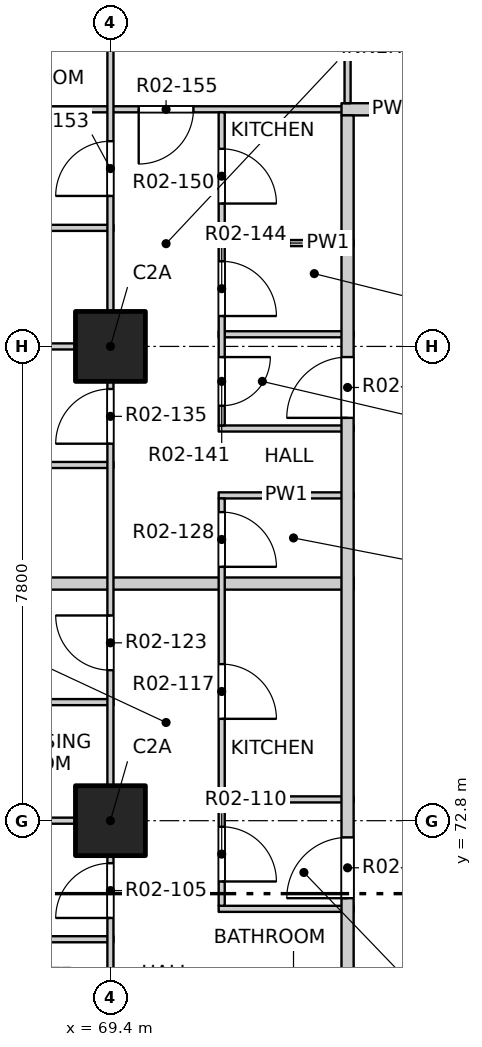
"""IFC4 building model, lengths in metres.
Left out: names, types, materials, properties, quantities, classifications, styles, units other than length and angle.
Written with IfcOpenShell. Run it as: python <this file> out.ifc"""

import sys

from ifc_helpers import new_model, si_unit, direction, frame, frame_2d, origin, origin_2d, place, context, subcontext, project, spatial, rectangle, extrude, element, fill, save


model = new_model("IFC4")
c1 = context("Model", 3, precision=1e-05, world=origin(), true_north=direction((0.0, 1.0)))
c2 = subcontext(c1, "Body", "Model", "MODEL_VIEW")
j1 = project(units=[si_unit("LENGTHUNIT", "METRE"), si_unit("PLANEANGLEUNIT", "RADIAN")], contexts=[c1])
p1 = place(None, origin())
s1 = spatial("IfcSite", under=j1, at=p1, CompositionType="ELEMENT")
p2 = place(p1, origin())
s2 = spatial("IfcBuilding", under=s1, at=p2, CompositionType="ELEMENT")
p3 = place(p2, frame((0.0, 0.0, 29.7)))
s3 = spatial("IfcBuildingStorey", under=s2, at=p3, CompositionType="ELEMENT", Elevation=29.7)
for number, where, z_axis, x_axis in (
    (1, (69.4, 72.8, -0.25), (0.0, 0.0, 1.0), (1.0, 0.0, 0.0)),
    (2, (69.4, 80.6, -0.25), (0.0, 0.0, 1.0), (1.0, 0.0, 0.0)),
):
    element("IfcColumn", number, at=place(p3, frame(where, z_axis=z_axis, x_axis=x_axis)), inside=s3, PredefinedType="COLUMN", context=c2, shape_type="SweptSolid", body=[
        extrude(rectangle(XDim=1.15, YDim=1.15, at=origin_2d()), origin(), (0.0, 0.0, 1.0), 3.4),
    ])
p4 = place(p3, frame((66.05, 70.85, 0.0), z_axis=(0.0, 0.0, 1.0), x_axis=(1.0, 0.0, 0.0)))
e3 = element("IfcWall", 3, at=p4, inside=s3, PredefinedType="PARTITIONING", context=c2, shape_type="SweptSolid", body=[
    extrude(rectangle(XDim=3.4, YDim=0.1, at=frame_2d((1.7, 0.0))), origin(), (0.0, 0.0, 1.0), 3.15),
])
p5 = place(p3, frame((71.18, 71.35, 0.0), z_axis=(0.0, 0.0, 1.0), x_axis=(1.0, 0.0, 0.0)))
e4 = element("IfcWall", 4, at=p5, inside=s3, PredefinedType="PARTITIONING", context=c2, shape_type="SweptSolid", body=[
    extrude(rectangle(XDim=2.22, YDim=0.1, at=frame_2d((1.11, 0.0))), origin(), (0.0, 0.0, 1.0), 3.15),
])
p6 = place(p3, frame((61.9, 72.8, 0.0), z_axis=(0.0, 0.0, 1.0), x_axis=(1.0, 0.0, 0.0)))
e5 = element("IfcWall", 5, at=p6, inside=s3, PredefinedType="PARTITIONING", context=c2, shape_type="SweptSolid", body=[
    extrude(rectangle(XDim=7.55, YDim=0.1, at=frame_2d((3.775, 0.0))), origin(), (0.0, 0.0, 1.0), 2.55),
])
p7 = place(p3, frame((71.18, 73.15, 0.0), z_axis=(0.0, 0.0, 1.0), x_axis=(1.0, 0.0, 0.0)))
e6 = element("IfcWall", 6, at=p7, inside=s3, PredefinedType="PARTITIONING", context=c2, shape_type="SweptSolid", body=[
    extrude(rectangle(XDim=2.22, YDim=0.1, at=frame_2d((1.11, 0.0))), origin(), (0.0, 0.0, 1.0), 3.15),
])
p8 = place(p3, frame((66.05, 74.75, 0.0), z_axis=(0.0, 0.0, 1.0), x_axis=(1.0, 0.0, 0.0)))
e7 = element("IfcWall", 7, at=p8, inside=s3, PredefinedType="PARTITIONING", context=c2, shape_type="SweptSolid", body=[
    extrude(rectangle(XDim=3.4, YDim=0.1, at=frame_2d((1.7, 0.0))), origin(), (0.0, 0.0, 1.0), 3.15),
])
p9 = place(p3, frame((61.9, 76.7, 0.0), z_axis=(0.0, 0.0, 1.0), x_axis=(1.0, 0.0, 0.0)))
e8 = element("IfcWall", 8, at=p9, inside=s3, PredefinedType="PARTITIONING", context=c2, shape_type="SweptSolid", body=[
    extrude(rectangle(XDim=11.5, YDim=0.2, at=frame_2d((5.75, 0.0))), origin(), (0.0, 0.0, 1.0), 3.15),
])
p10 = place(p3, frame((71.18, 78.15, 0.0), z_axis=(0.0, 0.0, 1.0), x_axis=(1.0, 0.0, 0.0)))
e9 = element("IfcWall", 9, at=p10, inside=s3, PredefinedType="PARTITIONING", context=c2, shape_type="SweptSolid", body=[
    extrude(rectangle(XDim=2.22, YDim=0.1, at=frame_2d((1.11, 0.0))), origin(), (0.0, 0.0, 1.0), 3.15),
])
p11 = place(p3, frame((65.75, 78.65, 0.0), z_axis=(0.0, 0.0, 1.0), x_axis=(1.0, 0.0, 0.0)))
e10 = element("IfcWall", 10, at=p11, inside=s3, PredefinedType="PARTITIONING", context=c2, shape_type="SweptSolid", body=[
    extrude(rectangle(XDim=3.7, YDim=0.1, at=frame_2d((1.85, 0.0))), origin(), (0.0, 0.0, 1.0), 3.15),
])
p12 = place(p3, frame((71.18, 79.25, 0.0), z_axis=(0.0, 0.0, 1.0), x_axis=(1.0, 0.0, 0.0)))
e11 = element("IfcWall", 11, at=p12, inside=s3, PredefinedType="PARTITIONING", context=c2, shape_type="SweptSolid", body=[
    extrude(rectangle(XDim=2.22, YDim=0.1, at=frame_2d((1.11, 0.0))), origin(), (0.0, 0.0, 1.0), 3.15),
])
p13 = place(p3, frame((61.9, 80.6, 0.0), z_axis=(0.0, 0.0, 1.0), x_axis=(1.0, 0.0, 0.0)))
e12 = element("IfcWall", 12, at=p13, inside=s3, PredefinedType="PARTITIONING", context=c2, shape_type="SweptSolid", body=[
    extrude(rectangle(XDim=7.55, YDim=0.1, at=frame_2d((3.775, 0.0))), origin(), (0.0, 0.0, 1.0), 2.55),
])
for number, where, z_axis, x_axis in (
    (13, (71.18, 80.8, 0.0), (0.0, 0.0, 1.0), (1.0, 0.0, 0.0)),
    (14, (71.18, 82.3, 0.0), (0.0, 0.0, 1.0), (1.0, 0.0, 0.0)),
):
    element("IfcWall", number, at=place(p3, frame(where, z_axis=z_axis, x_axis=x_axis)), inside=s3, PredefinedType="PARTITIONING", context=c2, shape_type="SweptSolid", body=[
        extrude(rectangle(XDim=2.22, YDim=0.1, at=frame_2d((1.11, 0.0))), origin(), (0.0, 0.0, 1.0), 3.15),
    ])
p14 = place(p3, frame((65.75, 82.55, 0.0), z_axis=(0.0, 0.0, 1.0), x_axis=(1.0, 0.0, 0.0)))
e15 = element("IfcWall", 15, at=p14, inside=s3, PredefinedType="PARTITIONING", context=c2, shape_type="SweptSolid", body=[
    extrude(rectangle(XDim=3.7, YDim=0.1, at=frame_2d((1.85, 0.0))), origin(), (0.0, 0.0, 1.0), 3.15),
])
p15 = place(p3, frame((61.9, 84.5, 0.0), z_axis=(0.0, 0.0, 1.0), x_axis=(1.0, 0.0, 0.0)))
e16 = element("IfcWall", 16, at=p15, inside=s3, PredefinedType="PARTITIONING", context=c2, shape_type="SweptSolid", body=[
    extrude(rectangle(XDim=11.5, YDim=0.1, at=frame_2d((5.75, 0.0))), origin(), (0.0, 0.0, 1.0), 3.15),
])
p16 = place(p15, frame((7.965, 0.0, 0.0)))
e17 = element("IfcOpeningElement", 17, at=p16, cuts=e16, PredefinedType="OPENING", context=c2, shape_type="SweptSolid", body=[
    extrude(rectangle(XDim=0.9, YDim=2.1, at=frame_2d((0.45, 1.05))), frame((0.0, 0.06, 0.0), z_axis=(0.0, -1.0, 0.0), x_axis=(1.0, 0.0, 0.0)), (0.0, 0.0, 1.0), 0.12),
])
p17 = place(p3, frame((73.2, 84.5, 0.0), z_axis=(0.0, 0.0, 1.0), x_axis=(1.0, 0.0, 0.0)))
e18 = element("IfcWall", 18, at=p17, inside=s3, PredefinedType="PARTITIONING", context=c2, shape_type="SweptSolid", body=[
    extrude(rectangle(XDim=1.7, YDim=0.2, at=frame_2d((0.85, 0.0))), origin(), (0.0, 0.0, 1.0), 3.15),
])
p18 = place(p3, frame((69.4, 49.4, 0.0), z_axis=(0.0, 0.0, 1.0), x_axis=(0.0, 1.0, 0.0)))
e19 = element("IfcWall", 19, at=p18, inside=s3, PredefinedType="PARTITIONING", context=c2, shape_type="SweptSolid", body=[
    extrude(rectangle(XDim=31.2, YDim=0.1, at=frame_2d((15.6, 0.0))), origin(), (0.0, 0.0, 1.0), 3.15),
])
p19 = place(p18, frame((2.475, 0.0, 0.0)))
e20 = element("IfcOpeningElement", 20, at=p19, cuts=e19, PredefinedType="OPENING", context=c2, shape_type="SweptSolid", body=[
    extrude(rectangle(XDim=0.9, YDim=2.1, at=frame_2d((0.45, 1.05))), frame((0.0, 0.06, 0.0), z_axis=(0.0, -1.0, 0.0), x_axis=(1.0, 0.0, 0.0)), (0.0, 0.0, 1.0), 0.12),
])
p20 = place(p18, frame((5.4, 0.0, 0.0)))
e21 = element("IfcOpeningElement", 21, at=p20, cuts=e19, PredefinedType="OPENING", context=c2, shape_type="SweptSolid", body=[
    extrude(rectangle(XDim=0.9, YDim=2.1, at=frame_2d((0.45, 1.05))), frame((0.0, 0.06, 0.0), z_axis=(0.0, -1.0, 0.0), x_axis=(1.0, 0.0, 0.0)), (0.0, 0.0, 1.0), 0.12),
])
p21 = place(p18, frame((10.275, 0.0, 0.0)))
e22 = element("IfcOpeningElement", 22, at=p21, cuts=e19, PredefinedType="OPENING", context=c2, shape_type="SweptSolid", body=[
    extrude(rectangle(XDim=0.9, YDim=2.1, at=frame_2d((0.45, 1.05))), frame((0.0, 0.06, 0.0), z_axis=(0.0, -1.0, 0.0), x_axis=(1.0, 0.0, 0.0)), (0.0, 0.0, 1.0), 0.12),
])
p22 = place(p18, frame((14.0, 0.0, 0.0)))
e23 = element("IfcOpeningElement", 23, at=p22, cuts=e19, PredefinedType="OPENING", context=c2, shape_type="SweptSolid", body=[
    extrude(rectangle(XDim=0.9, YDim=2.1, at=frame_2d((0.45, 1.05))), frame((0.0, 0.06, 0.0), z_axis=(0.0, -1.0, 0.0), x_axis=(1.0, 0.0, 0.0)), (0.0, 0.0, 1.0), 0.12),
])
p23 = place(p18, frame((17.1, 0.0, 0.0)))
e24 = element("IfcOpeningElement", 24, at=p23, cuts=e19, PredefinedType="OPENING", context=c2, shape_type="SweptSolid", body=[
    extrude(rectangle(XDim=0.9, YDim=2.1, at=frame_2d((0.45, 1.05))), frame((0.0, 0.06, 0.0), z_axis=(0.0, -1.0, 0.0), x_axis=(1.0, 0.0, 0.0)), (0.0, 0.0, 1.0), 0.12),
])
p24 = place(p18, frame((21.8, 0.0, 0.0)))
e25 = element("IfcOpeningElement", 25, at=p24, cuts=e19, PredefinedType="OPENING", context=c2, shape_type="SweptSolid", body=[
    extrude(rectangle(XDim=0.9, YDim=2.1, at=frame_2d((0.45, 1.05))), frame((0.0, 0.06, 0.0), z_axis=(0.0, -1.0, 0.0), x_axis=(1.0, 0.0, 0.0)), (0.0, 0.0, 1.0), 0.12),
])
p25 = place(p18, frame((25.875, 0.0, 0.0)))
e26 = element("IfcOpeningElement", 26, at=p25, cuts=e19, PredefinedType="OPENING", context=c2, shape_type="SweptSolid", body=[
    extrude(rectangle(XDim=0.9, YDim=2.1, at=frame_2d((0.45, 1.05))), frame((0.0, 0.06, 0.0), z_axis=(0.0, -1.0, 0.0), x_axis=(1.0, 0.0, 0.0)), (0.0, 0.0, 1.0), 0.12),
])
p26 = place(p18, frame((29.6, 0.0, 0.0)))
e27 = element("IfcOpeningElement", 27, at=p26, cuts=e19, PredefinedType="OPENING", context=c2, shape_type="SweptSolid", body=[
    extrude(rectangle(XDim=0.9, YDim=2.1, at=frame_2d((0.45, 1.05))), frame((0.0, 0.06, 0.0), z_axis=(0.0, -1.0, 0.0), x_axis=(1.0, 0.0, 0.0)), (0.0, 0.0, 1.0), 0.12),
])
p27 = place(p3, frame((69.4, 80.6, 0.0), z_axis=(0.0, 0.0, 1.0), x_axis=(0.0, 1.0, 0.0)))
e28 = element("IfcWall", 28, at=p27, inside=s3, PredefinedType="PARTITIONING", context=c2, shape_type="SweptSolid", body=[
    extrude(rectangle(XDim=7.5, YDim=0.1, at=frame_2d((3.75, 0.0))), origin(), (0.0, 0.0, 1.0), 2.55),
])
p28 = place(p27, frame((2.475, 0.0, 0.0)))
e29 = element("IfcOpeningElement", 29, at=p28, cuts=e28, PredefinedType="OPENING", context=c2, shape_type="SweptSolid", body=[
    extrude(rectangle(XDim=0.9, YDim=2.1, at=frame_2d((0.45, 1.05))), frame((0.0, 0.06, 0.0), z_axis=(0.0, -1.0, 0.0), x_axis=(1.0, 0.0, 0.0)), (0.0, 0.0, 1.0), 0.12),
])
p29 = place(p27, frame((5.4, 0.0, 0.0)))
e30 = element("IfcOpeningElement", 30, at=p29, cuts=e28, PredefinedType="OPENING", context=c2, shape_type="SweptSolid", body=[
    extrude(rectangle(XDim=0.9, YDim=2.1, at=frame_2d((0.45, 1.05))), frame((0.0, 0.06, 0.0), z_axis=(0.0, -1.0, 0.0), x_axis=(1.0, 0.0, 0.0)), (0.0, 0.0, 1.0), 0.12),
])
p30 = place(p3, frame((71.23, 71.4, 0.0), z_axis=(0.0, 0.0, 1.0), x_axis=(0.0, 1.0, 0.0)))
e31 = element("IfcWall", 31, at=p30, inside=s3, PredefinedType="PARTITIONING", context=c2, shape_type="SweptSolid", body=[
    extrude(rectangle(XDim=6.7, YDim=0.1, at=frame_2d((3.35, 0.0))), origin(), (0.0, 0.0, 1.0), 3.15),
])
p31 = place(p30, frame((0.4, 0.0, 0.0)))
e32 = element("IfcOpeningElement", 32, at=p31, cuts=e31, PredefinedType="OPENING", context=c2, shape_type="SweptSolid", body=[
    extrude(rectangle(XDim=0.9, YDim=2.1, at=frame_2d((0.45, 1.05))), frame((0.0, 0.06, 0.0), z_axis=(0.0, -1.0, 0.0), x_axis=(1.0, 0.0, 0.0)), (0.0, 0.0, 1.0), 0.12),
])
p32 = place(p30, frame((3.075, 0.0, 0.0)))
e33 = element("IfcOpeningElement", 33, at=p32, cuts=e31, PredefinedType="OPENING", context=c2, shape_type="SweptSolid", body=[
    extrude(rectangle(XDim=0.9, YDim=2.1, at=frame_2d((0.45, 1.05))), frame((0.0, 0.06, 0.0), z_axis=(0.0, -1.0, 0.0), x_axis=(1.0, 0.0, 0.0)), (0.0, 0.0, 1.0), 0.12),
])
p33 = place(p30, frame((5.575, 0.0, 0.0)))
e34 = element("IfcOpeningElement", 34, at=p33, cuts=e31, PredefinedType="OPENING", context=c2, shape_type="SweptSolid", body=[
    extrude(rectangle(XDim=0.9, YDim=2.1, at=frame_2d((0.45, 1.05))), frame((0.0, 0.06, 0.0), z_axis=(0.0, -1.0, 0.0), x_axis=(1.0, 0.0, 0.0)), (0.0, 0.0, 1.0), 0.12),
])
p34 = place(p3, frame((71.23, 79.3, 0.0), z_axis=(0.0, 0.0, 1.0), x_axis=(0.0, 1.0, 0.0)))
e35 = element("IfcWall", 35, at=p34, inside=s3, PredefinedType="PARTITIONING", context=c2, shape_type="SweptSolid", body=[
    extrude(rectangle(XDim=5.15, YDim=0.1, at=frame_2d((2.575, 0.0))), origin(), (0.0, 0.0, 1.0), 3.15),
])
p35 = place(p34, frame((0.325, 0.0, 0.0)))
e36 = element("IfcOpeningElement", 36, at=p35, cuts=e35, PredefinedType="OPENING", context=c2, shape_type="SweptSolid", body=[
    extrude(rectangle(XDim=0.8, YDim=2.1, at=frame_2d((0.4, 1.05))), frame((0.0, 0.06, 0.0), z_axis=(0.0, -1.0, 0.0), x_axis=(1.0, 0.0, 0.0)), (0.0, 0.0, 1.0), 0.12),
])
p36 = place(p34, frame((1.8, 0.0, 0.0)))
e37 = element("IfcOpeningElement", 37, at=p36, cuts=e35, PredefinedType="OPENING", context=c2, shape_type="SweptSolid", body=[
    extrude(rectangle(XDim=0.9, YDim=2.1, at=frame_2d((0.45, 1.05))), frame((0.0, 0.06, 0.0), z_axis=(0.0, -1.0, 0.0), x_axis=(1.0, 0.0, 0.0)), (0.0, 0.0, 1.0), 0.12),
])
p37 = place(p34, frame((3.65, 0.0, 0.0)))
e38 = element("IfcOpeningElement", 38, at=p37, cuts=e35, PredefinedType="OPENING", context=c2, shape_type="SweptSolid", body=[
    extrude(rectangle(XDim=0.9, YDim=2.1, at=frame_2d((0.45, 1.05))), frame((0.0, 0.06, 0.0), z_axis=(0.0, -1.0, 0.0), x_axis=(1.0, 0.0, 0.0)), (0.0, 0.0, 1.0), 0.12),
])
p38 = place(p3, frame((73.3, 53.4, 0.0), z_axis=(0.0, 0.0, 1.0), x_axis=(0.0, 1.0, 0.0)))
e39 = element("IfcWall", 39, at=p38, inside=s3, PredefinedType="PARTITIONING", context=c2, shape_type="SweptSolid", body=[
    extrude(rectangle(XDim=31.0, YDim=0.2, at=frame_2d((15.5, 0.0))), origin(), (0.0, 0.0, 1.0), 3.15),
])
p39 = place(p38, frame((2.675, 0.0, 0.0)))
e40 = element("IfcOpeningElement", 40, at=p39, cuts=e39, PredefinedType="OPENING", context=c2, shape_type="SweptSolid", body=[
    extrude(rectangle(XDim=1.0, YDim=2.1, at=frame_2d((0.5, 1.05))), frame((0.0, 0.11, 0.0), z_axis=(0.0, -1.0, 0.0), x_axis=(1.0, 0.0, 0.0)), (0.0, 0.0, 1.0), 0.22),
])
p40 = place(p38, frame((18.125, 0.0, 0.0)))
e41 = element("IfcOpeningElement", 41, at=p40, cuts=e39, PredefinedType="OPENING", context=c2, shape_type="SweptSolid", body=[
    extrude(rectangle(XDim=1.0, YDim=2.1, at=frame_2d((0.5, 1.05))), frame((0.0, 0.11, 0.0), z_axis=(0.0, -1.0, 0.0), x_axis=(1.0, 0.0, 0.0)), (0.0, 0.0, 1.0), 0.22),
])
p41 = place(p38, frame((26.025, 0.0, 0.0)))
e42 = element("IfcOpeningElement", 42, at=p41, cuts=e39, PredefinedType="OPENING", context=c2, shape_type="SweptSolid", body=[
    extrude(rectangle(XDim=1.0, YDim=2.1, at=frame_2d((0.5, 1.05))), frame((0.0, 0.11, 0.0), z_axis=(0.0, -1.0, 0.0), x_axis=(1.0, 0.0, 0.0)), (0.0, 0.0, 1.0), 0.22),
])
p42 = place(p3, frame((73.3, 84.6, 0.0), z_axis=(0.0, 0.0, 1.0), x_axis=(0.0, 1.0, 0.0)))
e43 = element("IfcWall", 43, at=p42, inside=s3, PredefinedType="PARTITIONING", context=c2, shape_type="SweptSolid", body=[
    extrude(rectangle(XDim=3.5, YDim=0.1, at=frame_2d((1.75, 0.0))), origin(), (0.0, 0.0, 1.0), 3.15),
])
p43 = place(p42, frame((1.4, 0.0, 0.0)))
e44 = element("IfcOpeningElement", 44, at=p43, cuts=e43, PredefinedType="OPENING", context=c2, shape_type="SweptSolid", body=[
    extrude(rectangle(XDim=0.9, YDim=2.1, at=frame_2d((0.45, 1.05))), frame((0.0, 0.06, 0.0), z_axis=(0.0, -1.0, 0.0), x_axis=(1.0, 0.0, 0.0)), (0.0, 0.0, 1.0), 0.12),
])
p44 = place(p24, origin())
e45 = element("IfcDoor", 45, at=p44, inside=s3, OperationType="SINGLE_SWING_LEFT", PredefinedType="DOOR", context=c2, shape_type="SweptSolid", body=[
    extrude(rectangle(XDim=0.9, YDim=2.1, at=frame_2d((0.45, 1.05))), frame((0.0, 0.025, 0.0), z_axis=(0.0, -1.0, 0.0), x_axis=(1.0, 0.0, 0.0)), (0.0, 0.0, 1.0), 0.05),
])
fill(e25, e45)
p45 = place(p40, origin())
e46 = element("IfcDoor", 46, at=p45, inside=s3, OperationType="SINGLE_SWING_RIGHT", PredefinedType="DOOR", context=c2, shape_type="SweptSolid", body=[
    extrude(rectangle(XDim=1.0, YDim=2.1, at=frame_2d((0.5, 1.05))), frame((0.0, 0.025, 0.0), z_axis=(0.0, -1.0, 0.0), x_axis=(1.0, 0.0, 0.0)), (0.0, 0.0, 1.0), 0.05),
])
fill(e41, e46)
p46 = place(p31, origin())
e47 = element("IfcDoor", 47, at=p46, inside=s3, OperationType="SINGLE_SWING_RIGHT", PredefinedType="DOOR", context=c2, shape_type="SweptSolid", body=[
    extrude(rectangle(XDim=0.9, YDim=2.1, at=frame_2d((0.45, 1.05))), frame((0.0, 0.025, 0.0), z_axis=(0.0, -1.0, 0.0), x_axis=(1.0, 0.0, 0.0)), (0.0, 0.0, 1.0), 0.05),
])
fill(e32, e47)
p47 = place(p32, origin())
e48 = element("IfcDoor", 48, at=p47, inside=s3, OperationType="SINGLE_SWING_RIGHT", PredefinedType="DOOR", context=c2, shape_type="SweptSolid", body=[
    extrude(rectangle(XDim=0.9, YDim=2.1, at=frame_2d((0.45, 1.05))), frame((0.0, 0.025, 0.0), z_axis=(0.0, -1.0, 0.0), x_axis=(1.0, 0.0, 0.0)), (0.0, 0.0, 1.0), 0.05),
])
fill(e33, e48)
p48 = place(p25, origin())
e49 = element("IfcDoor", 49, at=p48, inside=s3, OperationType="SINGLE_SWING_RIGHT", PredefinedType="DOOR", context=c2, shape_type="SweptSolid", body=[
    extrude(rectangle(XDim=0.9, YDim=2.1, at=frame_2d((0.45, 1.05))), frame((0.0, 0.025, 0.0), z_axis=(0.0, -1.0, 0.0), x_axis=(1.0, 0.0, 0.0)), (0.0, 0.0, 1.0), 0.05),
])
fill(e26, e49)
p49 = place(p33, origin())
e50 = element("IfcDoor", 50, at=p49, inside=s3, OperationType="SINGLE_SWING_RIGHT", PredefinedType="DOOR", context=c2, shape_type="SweptSolid", body=[
    extrude(rectangle(XDim=0.9, YDim=2.1, at=frame_2d((0.45, 1.05))), frame((0.0, 0.025, 0.0), z_axis=(0.0, -1.0, 0.0), x_axis=(1.0, 0.0, 0.0)), (0.0, 0.0, 1.0), 0.05),
])
fill(e34, e50)
p50 = place(p26, origin())
e51 = element("IfcDoor", 51, at=p50, inside=s3, OperationType="SINGLE_SWING_LEFT", PredefinedType="DOOR", context=c2, shape_type="SweptSolid", body=[
    extrude(rectangle(XDim=0.9, YDim=2.1, at=frame_2d((0.45, 1.05))), frame((0.0, 0.025, 0.0), z_axis=(0.0, -1.0, 0.0), x_axis=(1.0, 0.0, 0.0)), (0.0, 0.0, 1.0), 0.05),
])
fill(e27, e51)
p51 = place(p41, origin())
e52 = element("IfcDoor", 52, at=p51, inside=s3, OperationType="SINGLE_SWING_RIGHT", PredefinedType="DOOR", context=c2, shape_type="SweptSolid", body=[
    extrude(rectangle(XDim=1.0, YDim=2.1, at=frame_2d((0.5, 1.05))), frame((0.0, 0.025, 0.0), z_axis=(0.0, -1.0, 0.0), x_axis=(1.0, 0.0, 0.0)), (0.0, 0.0, 1.0), 0.05),
])
fill(e42, e52)
p52 = place(p35, origin())
e53 = element("IfcDoor", 53, at=p52, inside=s3, OperationType="SINGLE_SWING_LEFT", PredefinedType="DOOR", context=c2, shape_type="SweptSolid", body=[
    extrude(rectangle(XDim=0.8, YDim=2.1, at=frame_2d((0.4, 1.05))), frame((0.0, 0.025, 0.0), z_axis=(0.0, -1.0, 0.0), x_axis=(1.0, 0.0, 0.0)), (0.0, 0.0, 1.0), 0.05),
])
fill(e36, e53)
p53 = place(p36, origin())
e54 = element("IfcDoor", 54, at=p53, inside=s3, OperationType="SINGLE_SWING_RIGHT", PredefinedType="DOOR", context=c2, shape_type="SweptSolid", body=[
    extrude(rectangle(XDim=0.9, YDim=2.1, at=frame_2d((0.45, 1.05))), frame((0.0, 0.025, 0.0), z_axis=(0.0, -1.0, 0.0), x_axis=(1.0, 0.0, 0.0)), (0.0, 0.0, 1.0), 0.05),
])
fill(e37, e54)
p54 = place(p37, origin())
e55 = element("IfcDoor", 55, at=p54, inside=s3, OperationType="SINGLE_SWING_RIGHT", PredefinedType="DOOR", context=c2, shape_type="SweptSolid", body=[
    extrude(rectangle(XDim=0.9, YDim=2.1, at=frame_2d((0.45, 1.05))), frame((0.0, 0.025, 0.0), z_axis=(0.0, -1.0, 0.0), x_axis=(1.0, 0.0, 0.0)), (0.0, 0.0, 1.0), 0.05),
])
fill(e38, e55)
p55 = place(p28, origin())
e56 = element("IfcDoor", 56, at=p55, inside=s3, OperationType="SINGLE_SWING_LEFT", PredefinedType="DOOR", context=c2, shape_type="SweptSolid", body=[
    extrude(rectangle(XDim=0.9, YDim=2.1, at=frame_2d((0.45, 1.05))), frame((0.0, 0.025, 0.0), z_axis=(0.0, -1.0, 0.0), x_axis=(1.0, 0.0, 0.0)), (0.0, 0.0, 1.0), 0.05),
])
fill(e29, e56)
p56 = place(p16, origin())
e57 = element("IfcDoor", 57, at=p56, inside=s3, OperationType="SINGLE_SWING_RIGHT", PredefinedType="DOOR", context=c2, shape_type="SweptSolid", body=[
    extrude(rectangle(XDim=0.9, YDim=2.1, at=frame_2d((0.45, 1.05))), frame((0.0, 0.025, 0.0), z_axis=(0.0, -1.0, 0.0), x_axis=(1.0, 0.0, 0.0)), (0.0, 0.0, 1.0), 0.05),
])
fill(e17, e57)
save(model, sys.argv[1])
